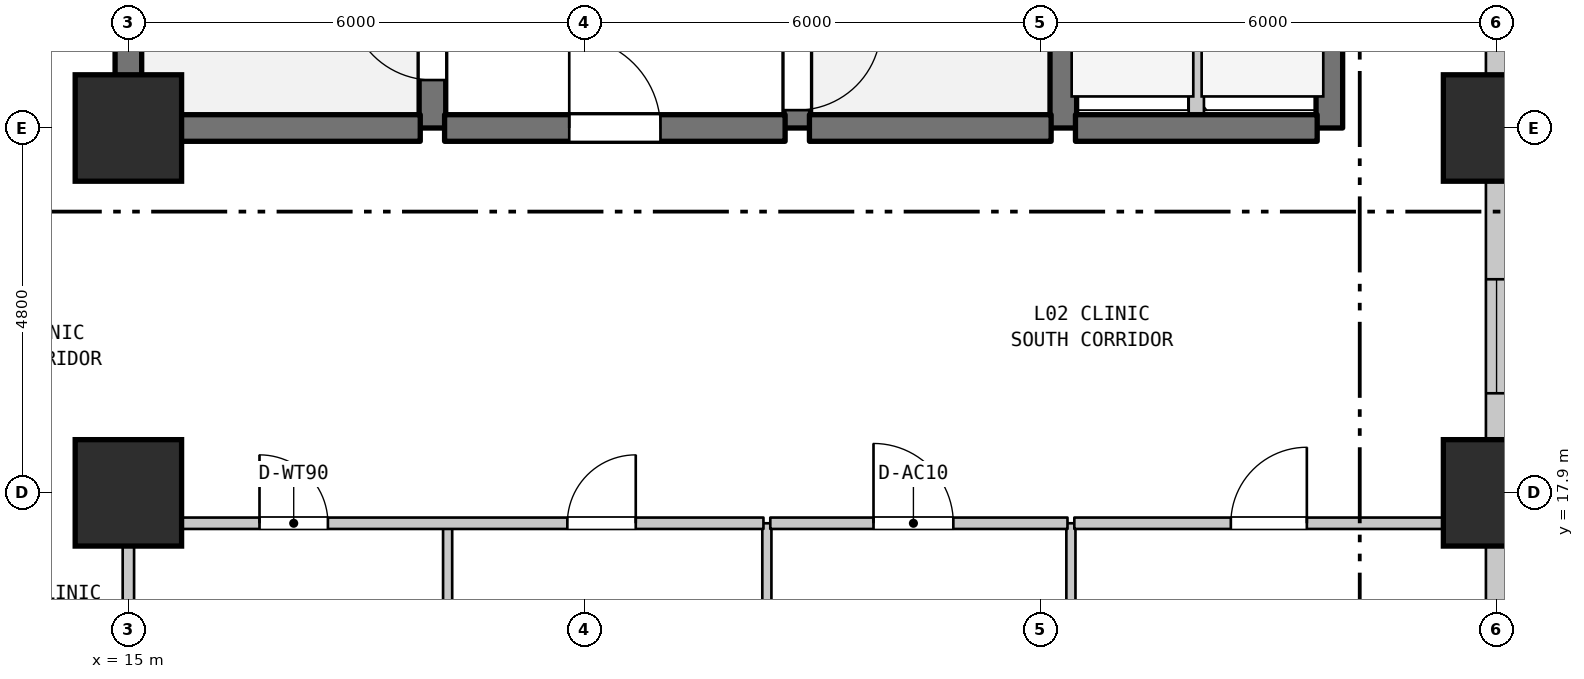
"""IFC4 building model, lengths in metres.
Left out: names, types, materials, properties, quantities, classifications, styles, units other than length and angle.
Written with IfcOpenShell. Run it as: python <this file> out.ifc"""

import sys

from ifc_helpers import new_model, si_unit, direction, frame, frame_2d, origin, origin_2d, place, context, subcontext, project, spatial, rectangle, extrude, element, fill, save


model = new_model("IFC4")
c1 = context("Model", 3, precision=1e-05, world=origin(), true_north=direction((0.0, 1.0)))
c2 = subcontext(c1, "Body", "Model", "MODEL_VIEW")
j1 = project(units=[si_unit("LENGTHUNIT", "METRE"), si_unit("PLANEANGLEUNIT", "RADIAN")], contexts=[c1])
p1 = place(None, origin())
s1 = spatial("IfcSite", under=j1, at=p1, CompositionType="ELEMENT")
p2 = place(p1, origin())
s2 = spatial("IfcBuilding", under=s1, at=p2, CompositionType="ELEMENT")
p3 = place(p2, frame((0.0, 0.0, 13.0)))
s3 = spatial("IfcBuildingStorey", under=s2, at=p3, CompositionType="ELEMENT", Elevation=13.0)
for number, where, z_axis, x_axis in (
    (1, (15.0, 17.9, 0.0), (0.0, 0.0, 1.0), (1.0, 0.0, 0.0)),
    (2, (15.0, 22.7, 0.0), (0.0, 0.0, 1.0), (1.0, 0.0, 0.0)),
):
    element("IfcColumn", number, at=place(p3, frame(where, z_axis=z_axis, x_axis=x_axis)), inside=s3, PredefinedType="COLUMN", context=c2, shape_type="SweptSolid", body=[
        extrude(rectangle(XDim=1.4, YDim=1.4, at=origin_2d()), origin(), (0.0, 0.0, 1.0), 6.0),
    ])
for number, where, z_axis, x_axis in (
    (3, (33.0, 17.9, 0.0), (0.0, 0.0, 1.0), (1.0, 0.0, 0.0)),
    (4, (33.0, 22.7, 0.0), (0.0, 0.0, 1.0), (1.0, 0.0, 0.0)),
):
    element("IfcColumn", number, at=place(p3, frame(where, z_axis=z_axis, x_axis=x_axis)), inside=s3, PredefinedType="PILASTER", context=c2, shape_type="SweptSolid", body=[
        extrude(rectangle(XDim=1.4, YDim=1.4, at=origin_2d()), origin(), (0.0, 0.0, 1.0), 6.0),
    ])
p4 = place(p3, frame((15.0, 12.7, 0.0), z_axis=(0.0, 0.0, 1.0), x_axis=(0.0, 1.0, 0.0)))
e5 = element("IfcWall", 5, at=p4, inside=s3, PredefinedType="STANDARD", context=c2, shape_type="SweptSolid", body=[
    extrude(rectangle(XDim=4.8, YDim=0.15, at=frame_2d((2.4, 0.0))), origin(), (0.0, 0.0, 1.0), 5.08),
])
p5 = place(p3, frame((15.0, 22.7, 0.0), z_axis=(0.0, 0.0, 1.0), x_axis=(0.0, 1.0, 0.0)))
e6 = element("IfcWall", 6, at=p5, inside=s3, PredefinedType="SHEAR", context=c2, shape_type="SweptSolid", body=[
    extrude(rectangle(XDim=6.8, YDim=0.35, at=frame_2d((3.4, 0.0))), origin(), (0.0, 0.0, 1.0), 5.58),
])
p6 = place(p3, frame((19.0, 22.7, 0.0), z_axis=(0.0, 0.0, 1.0), x_axis=(0.0, 1.0, 0.0)))
e7 = element("IfcWall", 7, at=p6, inside=s3, PredefinedType="SHEAR", context=c2, shape_type="SweptSolid", body=[
    extrude(rectangle(XDim=5.5, YDim=0.35, at=frame_2d((2.75, 0.0))), origin(), (0.0, 0.0, 1.0), 5.58),
])
p7 = place(p6, frame((0.631, 0.0, 0.0)))
e8 = element("IfcOpeningElement", 8, at=p7, cuts=e7, PredefinedType="OPENING", context=c2, shape_type="SweptSolid", body=[
    extrude(rectangle(XDim=1.1, YDim=2.15, at=frame_2d((0.55, 1.075))), frame((0.0, 0.185, 0.0), z_axis=(0.0, -1.0, 0.0), x_axis=(1.0, 0.0, 0.0)), (0.0, 0.0, 1.0), 0.37),
])
for number, where, z_axis, x_axis in (
    (9, (19.2, 12.7, 0.0), (0.0, 0.0, 1.0), (0.0, 1.0, 0.0)),
    (10, (23.4, 12.7, 0.0), (0.0, 0.0, 1.0), (0.0, 1.0, 0.0)),
):
    element("IfcWall", number, at=place(p3, frame(where, z_axis=z_axis, x_axis=x_axis)), inside=s3, PredefinedType="PARTITIONING", context=c2, shape_type="SweptSolid", body=[
        extrude(rectangle(XDim=4.8, YDim=0.12, at=frame_2d((2.4, 0.0))), origin(), (0.0, 0.0, 1.0), 5.58),
    ])
p8 = place(p3, frame((23.8, 22.7, 0.0), z_axis=(0.0, 0.0, 1.0), x_axis=(0.0, 1.0, 0.0)))
e11 = element("IfcWall", 11, at=p8, inside=s3, PredefinedType="SHEAR", context=c2, shape_type="SweptSolid", body=[
    extrude(rectangle(XDim=5.5, YDim=0.35, at=frame_2d((2.75, 0.0))), origin(), (0.0, 0.0, 1.0), 5.58),
])
p9 = place(p8, frame((0.235, 0.0, 0.0)))
e12 = element("IfcOpeningElement", 12, at=p9, cuts=e11, PredefinedType="OPENING", context=c2, shape_type="SweptSolid", body=[
    extrude(rectangle(XDim=1.1, YDim=2.15, at=frame_2d((0.55, 1.075))), frame((0.0, 0.185, 0.0), z_axis=(0.0, -1.0, 0.0), x_axis=(1.0, 0.0, 0.0)), (0.0, 0.0, 1.0), 0.37),
])
p10 = place(p3, frame((27.3, 22.7, 0.0), z_axis=(0.0, 0.0, 1.0), x_axis=(0.0, 1.0, 0.0)))
e13 = element("IfcWall", 13, at=p10, inside=s3, PredefinedType="SHEAR", context=c2, shape_type="SweptSolid", body=[
    extrude(rectangle(XDim=2.9, YDim=0.35, at=frame_2d((1.45, 0.0))), origin(), (0.0, 0.0, 1.0), 5.58),
])
p11 = place(p3, frame((27.4, 12.7, 0.0), z_axis=(0.0, 0.0, 1.0), x_axis=(0.0, 1.0, 0.0)))
e14 = element("IfcWall", 14, at=p11, inside=s3, PredefinedType="PARTITIONING", context=c2, shape_type="SweptSolid", body=[
    extrude(rectangle(XDim=4.8, YDim=0.12, at=frame_2d((2.4, 0.0))), origin(), (0.0, 0.0, 1.0), 5.58),
])
p12 = place(p3, frame((29.05, 22.7, 0.0), z_axis=(0.0, 0.0, 1.0), x_axis=(0.0, 1.0, 0.0)))
e15 = element("IfcWall", 15, at=p12, inside=s3, PredefinedType="STANDARD", context=c2, shape_type="SweptSolid", body=[
    extrude(rectangle(XDim=2.9, YDim=0.2, at=frame_2d((1.45, 0.0))), origin(), (0.0, 0.0, 1.0), 5.58),
])
p13 = place(p3, frame((30.8, 22.7, 0.0), z_axis=(0.0, 0.0, 1.0), x_axis=(0.0, 1.0, 0.0)))
e16 = element("IfcWall", 16, at=p13, inside=s3, PredefinedType="SHEAR", context=c2, shape_type="SweptSolid", body=[
    extrude(rectangle(XDim=2.9, YDim=0.35, at=frame_2d((1.45, 0.0))), origin(), (0.0, 0.0, 1.0), 5.58),
])
p14 = place(p3, frame((15.06, 17.5, 0.0), z_axis=(0.0, 0.0, 1.0), x_axis=(1.0, 0.0, 0.0)))
e17 = element("IfcWall", 17, at=p14, inside=s3, PredefinedType="STANDARD", context=c2, shape_type="SweptSolid", body=[
    extrude(rectangle(XDim=8.295, YDim=0.15, at=frame_2d((4.147, 0.0))), origin(), (0.0, 0.0, 1.0), 5.58),
])
p15 = place(p14, frame((1.665, 0.0, 0.0)))
e18 = element("IfcOpeningElement", 18, at=p15, cuts=e17, PredefinedType="OPENING", context=c2, shape_type="SweptSolid", body=[
    extrude(rectangle(XDim=0.9, YDim=2.1, at=frame_2d((0.45, 1.05))), frame((0.0, 0.085, 0.0), z_axis=(0.0, -1.0, 0.0), x_axis=(1.0, 0.0, 0.0)), (0.0, 0.0, 1.0), 0.17),
])
p16 = place(p14, frame((5.715, 0.0, 0.0)))
e19 = element("IfcOpeningElement", 19, at=p16, cuts=e17, PredefinedType="OPENING", context=c2, shape_type="SweptSolid", body=[
    extrude(rectangle(XDim=0.9, YDim=2.1, at=frame_2d((0.45, 1.05))), frame((0.0, 0.085, 0.0), z_axis=(0.0, -1.0, 0.0), x_axis=(1.0, 0.0, 0.0)), (0.0, 0.0, 1.0), 0.17),
])
p17 = place(p3, frame((23.445, 17.5, 0.0), z_axis=(0.0, 0.0, 1.0), x_axis=(1.0, 0.0, 0.0)))
e20 = element("IfcWall", 20, at=p17, inside=s3, PredefinedType="STANDARD", context=c2, shape_type="SweptSolid", body=[
    extrude(rectangle(XDim=3.91, YDim=0.15, at=frame_2d((1.955, 0.0))), origin(), (0.0, 0.0, 1.0), 5.58),
])
p18 = place(p17, frame((1.358, 0.0, 0.0)))
e21 = element("IfcOpeningElement", 21, at=p18, cuts=e20, PredefinedType="OPENING", context=c2, shape_type="SweptSolid", body=[
    extrude(rectangle(XDim=1.05, YDim=2.15, at=frame_2d((0.525, 1.075))), frame((0.0, 0.085, 0.0), z_axis=(0.0, -1.0, 0.0), x_axis=(1.0, 0.0, 0.0)), (0.0, 0.0, 1.0), 0.17),
])
p19 = place(p3, frame((27.445, 17.5, 0.0), z_axis=(0.0, 0.0, 1.0), x_axis=(1.0, 0.0, 0.0)))
e22 = element("IfcWall", 22, at=p19, inside=s3, PredefinedType="STANDARD", context=c2, shape_type="SweptSolid", body=[
    extrude(rectangle(XDim=5.545, YDim=0.15, at=frame_2d((2.772, 0.0))), origin(), (0.0, 0.0, 1.0), 5.58),
])
p20 = place(p19, frame((2.059, 0.0, 0.0)))
e23 = element("IfcOpeningElement", 23, at=p20, cuts=e22, PredefinedType="OPENING", context=c2, shape_type="SweptSolid", body=[
    extrude(rectangle(XDim=1.0, YDim=2.15, at=frame_2d((0.5, 1.075))), frame((0.0, 0.085, 0.0), z_axis=(0.0, -1.0, 0.0), x_axis=(1.0, 0.0, 0.0)), (0.0, 0.0, 1.0), 0.17),
])
p21 = place(p3, frame((15.16, 22.7, 0.0), z_axis=(0.0, 0.0, 1.0), x_axis=(1.0, 0.0, 0.0)))
e24 = element("IfcWall", 24, at=p21, inside=s3, PredefinedType="SHEAR", context=c2, shape_type="SweptSolid", body=[
    extrude(rectangle(XDim=3.68, YDim=0.35, at=frame_2d((1.84, 0.0))), origin(), (0.0, 0.0, 1.0), 5.58),
])
p22 = place(p3, frame((19.16, 22.7, 0.0), z_axis=(0.0, 0.0, 1.0), x_axis=(1.0, 0.0, 0.0)))
e25 = element("IfcWall", 25, at=p22, inside=s3, PredefinedType="SHEAR", context=c2, shape_type="SweptSolid", body=[
    extrude(rectangle(XDim=4.48, YDim=0.35, at=frame_2d((2.24, 0.0))), origin(), (0.0, 0.0, 1.0), 5.58),
])
p23 = place(p22, frame((1.64, 0.0, 0.0)))
e26 = element("IfcOpeningElement", 26, at=p23, cuts=e25, PredefinedType="OPENING", context=c2, shape_type="SweptSolid", body=[
    extrude(rectangle(XDim=1.2, YDim=2.2, at=frame_2d((0.6, 1.1))), frame((0.0, 0.185, 0.0), z_axis=(0.0, -1.0, 0.0), x_axis=(1.0, 0.0, 0.0)), (0.0, 0.0, 1.0), 0.37),
])
for number, where, z_axis, x_axis in (
    (27, (23.96, 22.7, 0.0), (0.0, 0.0, 1.0), (1.0, 0.0, 0.0)),
    (28, (27.46, 22.7, 0.0), (0.0, 0.0, 1.0), (1.0, 0.0, 0.0)),
):
    element("IfcWall", number, at=place(p3, frame(where, z_axis=z_axis, x_axis=x_axis)), inside=s3, PredefinedType="SHEAR", context=c2, shape_type="SweptSolid", body=[
        extrude(rectangle(XDim=3.18, YDim=0.35, at=frame_2d((1.59, 0.0))), origin(), (0.0, 0.0, 1.0), 5.58),
    ])
p24 = place(p3, frame((33.0, 37.9, 0.0), z_axis=(0.0, 0.0, 1.0), x_axis=(0.0, -1.0, 0.0)))
e29 = element("IfcWall", 29, at=p24, inside=s3, PredefinedType="STANDARD", context=c2, shape_type="SweptSolid", body=[
    extrude(rectangle(XDim=37.2, YDim=0.28, at=frame_2d((18.6, 0.0))), origin(), (0.0, 0.0, 1.0), 5.08),
])
p25 = place(p24, frame((1.86, 0.0, 0.95)))
e30 = element("IfcOpeningElement", 30, at=p25, cuts=e29, PredefinedType="OPENING", context=c2, shape_type="SweptSolid", body=[
    extrude(rectangle(XDim=1.5, YDim=1.8, at=frame_2d((0.75, 0.9))), frame((0.0, 0.15, 0.0), z_axis=(0.0, -1.0, 0.0), x_axis=(1.0, 0.0, 0.0)), (0.0, 0.0, 1.0), 0.3),
])
p26 = place(p24, frame((7.12, 0.0, 0.95)))
e31 = element("IfcOpeningElement", 31, at=p26, cuts=e29, PredefinedType="OPENING", context=c2, shape_type="SweptSolid", body=[
    extrude(rectangle(XDim=1.5, YDim=1.8, at=frame_2d((0.75, 0.9))), frame((0.0, 0.15, 0.0), z_axis=(0.0, -1.0, 0.0), x_axis=(1.0, 0.0, 0.0)), (0.0, 0.0, 1.0), 0.3),
])
p27 = place(p24, frame((12.38, 0.0, 0.95)))
e32 = element("IfcOpeningElement", 32, at=p27, cuts=e29, PredefinedType="OPENING", context=c2, shape_type="SweptSolid", body=[
    extrude(rectangle(XDim=1.5, YDim=1.8, at=frame_2d((0.75, 0.9))), frame((0.0, 0.15, 0.0), z_axis=(0.0, -1.0, 0.0), x_axis=(1.0, 0.0, 0.0)), (0.0, 0.0, 1.0), 0.3),
])
p28 = place(p24, frame((17.19, 0.0, 0.95)))
e33 = element("IfcOpeningElement", 33, at=p28, cuts=e29, PredefinedType="OPENING", context=c2, shape_type="SweptSolid", body=[
    extrude(rectangle(XDim=1.5, YDim=1.8, at=frame_2d((0.75, 0.9))), frame((0.0, 0.15, 0.0), z_axis=(0.0, -1.0, 0.0), x_axis=(1.0, 0.0, 0.0)), (0.0, 0.0, 1.0), 0.3),
])
p29 = place(p24, frame((22.45, 0.0, 0.95)))
e34 = element("IfcOpeningElement", 34, at=p29, cuts=e29, PredefinedType="OPENING", context=c2, shape_type="SweptSolid", body=[
    extrude(rectangle(XDim=1.5, YDim=1.8, at=frame_2d((0.75, 0.9))), frame((0.0, 0.15, 0.0), z_axis=(0.0, -1.0, 0.0), x_axis=(1.0, 0.0, 0.0)), (0.0, 0.0, 1.0), 0.3),
])
p30 = place(p24, frame((28.16, 0.0, 0.95)))
e35 = element("IfcOpeningElement", 35, at=p30, cuts=e29, PredefinedType="OPENING", context=c2, shape_type="SweptSolid", body=[
    extrude(rectangle(XDim=1.5, YDim=1.8, at=frame_2d((0.75, 0.9))), frame((0.0, 0.15, 0.0), z_axis=(0.0, -1.0, 0.0), x_axis=(1.0, 0.0, 0.0)), (0.0, 0.0, 1.0), 0.3),
])
p31 = place(p24, frame((33.42, 0.0, 0.95)))
e36 = element("IfcOpeningElement", 36, at=p31, cuts=e29, PredefinedType="OPENING", context=c2, shape_type="SweptSolid", body=[
    extrude(rectangle(XDim=1.5, YDim=1.8, at=frame_2d((0.75, 0.9))), frame((0.0, 0.15, 0.0), z_axis=(0.0, -1.0, 0.0), x_axis=(1.0, 0.0, 0.0)), (0.0, 0.0, 1.0), 0.3),
])
p32 = place(p28, origin())
e37 = element("IfcWindow", 37, at=p32, inside=s3, PartitioningType="SINGLE_PANEL", PredefinedType="WINDOW", context=c2, shape_type="SweptSolid", body=[
    extrude(rectangle(XDim=1.5, YDim=1.8, at=frame_2d((0.75, 0.9))), frame((0.0, 0.03, 0.0), z_axis=(0.0, -1.0, 0.0), x_axis=(1.0, 0.0, 0.0)), (0.0, 0.0, 1.0), 0.06),
])
fill(e33, e37)
p33 = place(p7, origin())
e38 = element("IfcDoor", 38, at=p33, inside=s3, OperationType="SINGLE_SWING_RIGHT", PredefinedType="DOOR", context=c2, shape_type="SweptSolid", body=[
    extrude(rectangle(XDim=1.1, YDim=2.15, at=frame_2d((0.55, 1.075))), frame((0.0, 0.025, 0.0), z_axis=(0.0, -1.0, 0.0), x_axis=(1.0, 0.0, 0.0)), (0.0, 0.0, 1.0), 0.05),
])
fill(e8, e38)
p34 = place(p9, frame((1.1, 0.0, 0.0), z_axis=(0.0, 0.0, 1.0), x_axis=(-1.0, 0.0, 0.0)))
e39 = element("IfcDoor", 39, at=p34, inside=s3, OperationType="SINGLE_SWING_RIGHT", PredefinedType="DOOR", context=c2, shape_type="SweptSolid", body=[
    extrude(rectangle(XDim=1.1, YDim=2.15, at=frame_2d((0.55, 1.075))), frame((0.0, 0.025, 0.0), z_axis=(0.0, -1.0, 0.0), x_axis=(1.0, 0.0, 0.0)), (0.0, 0.0, 1.0), 0.05),
])
fill(e12, e39)
p35 = place(p15, origin())
e40 = element("IfcDoor", 40, at=p35, inside=s3, OperationType="SINGLE_SWING_LEFT", PredefinedType="DOOR", context=c2, shape_type="SweptSolid", body=[
    extrude(rectangle(XDim=0.9, YDim=2.1, at=frame_2d((0.45, 1.05))), frame((0.0, 0.025, 0.0), z_axis=(0.0, -1.0, 0.0), x_axis=(1.0, 0.0, 0.0)), (0.0, 0.0, 1.0), 0.05),
])
fill(e18, e40)
p36 = place(p16, origin())
e41 = element("IfcDoor", 41, at=p36, inside=s3, OperationType="SINGLE_SWING_RIGHT", PredefinedType="DOOR", context=c2, shape_type="SweptSolid", body=[
    extrude(rectangle(XDim=0.9, YDim=2.1, at=frame_2d((0.45, 1.05))), frame((0.0, 0.025, 0.0), z_axis=(0.0, -1.0, 0.0), x_axis=(1.0, 0.0, 0.0)), (0.0, 0.0, 1.0), 0.05),
])
fill(e19, e41)
p37 = place(p18, origin())
e42 = element("IfcDoor", 42, at=p37, inside=s3, OperationType="SINGLE_SWING_LEFT", PredefinedType="DOOR", context=c2, shape_type="SweptSolid", body=[
    extrude(rectangle(XDim=1.05, YDim=2.15, at=frame_2d((0.525, 1.075))), frame((0.0, 0.025, 0.0), z_axis=(0.0, -1.0, 0.0), x_axis=(1.0, 0.0, 0.0)), (0.0, 0.0, 1.0), 0.05),
])
fill(e21, e42)
p38 = place(p20, origin())
e43 = element("IfcDoor", 43, at=p38, inside=s3, OperationType="SINGLE_SWING_RIGHT", PredefinedType="DOOR", context=c2, shape_type="SweptSolid", body=[
    extrude(rectangle(XDim=1.0, YDim=2.15, at=frame_2d((0.5, 1.075))), frame((0.0, 0.025, 0.0), z_axis=(0.0, -1.0, 0.0), x_axis=(1.0, 0.0, 0.0)), (0.0, 0.0, 1.0), 0.05),
])
fill(e23, e43)
p39 = place(p23, origin())
e44 = element("IfcDoor", 44, at=p39, inside=s3, OperationType="SINGLE_SWING_LEFT", PredefinedType="DOOR", context=c2, shape_type="SweptSolid", body=[
    extrude(rectangle(XDim=1.2, YDim=2.2, at=frame_2d((0.6, 1.1))), frame((0.0, 0.025, 0.0), z_axis=(0.0, -1.0, 0.0), x_axis=(1.0, 0.0, 0.0)), (0.0, 0.0, 1.0), 0.05),
])
fill(e26, e44)
save(model, sys.argv[1])
